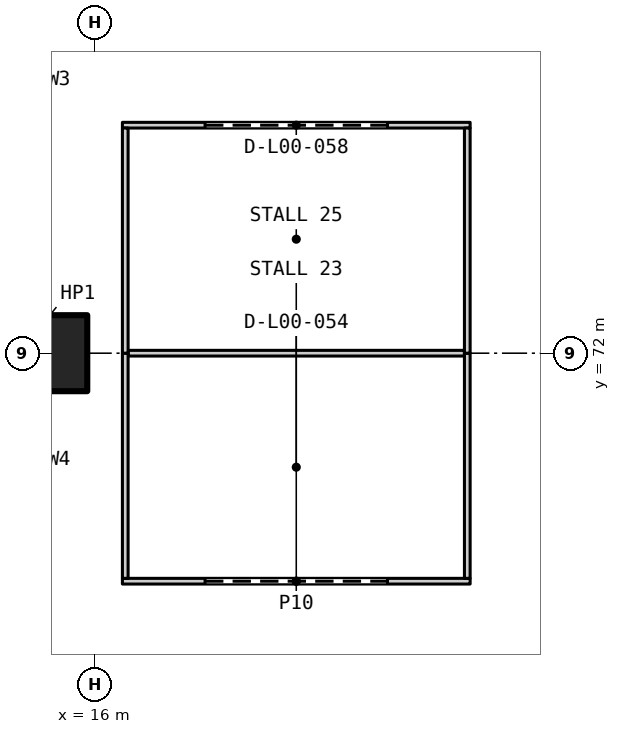
"""IFC4 building model, lengths in metres.
Left out: names, types, materials, properties, quantities, classifications, styles, units other than length and angle.
Written with IfcOpenShell. Run it as: python <this file> out.ifc"""

import sys

from ifc_helpers import new_model, si_unit, direction, frame, frame_2d, origin, origin_2d, place, context, subcontext, project, spatial, rectangle, extrude, element, fill, save


model = new_model("IFC4")
c1 = context("Model", 3, precision=1e-05, world=origin(), true_north=direction((0.0, 1.0)))
c2 = subcontext(c1, "Body", "Model", "MODEL_VIEW")
j1 = project(units=[si_unit("LENGTHUNIT", "METRE"), si_unit("PLANEANGLEUNIT", "RADIAN")], contexts=[c1])
p1 = place(None, origin())
s1 = spatial("IfcSite", under=j1, at=p1, CompositionType="ELEMENT")
p2 = place(p1, origin())
s2 = spatial("IfcBuilding", under=s1, at=p2, CompositionType="ELEMENT")
p3 = place(p2, origin())
s3 = spatial("IfcBuildingStorey", under=s2, at=p3, CompositionType="ELEMENT", Elevation=0.0)
p4 = place(p3, frame((15.0, 72.0, 0.0), z_axis=(0.0, 0.0, 1.0), x_axis=(1.0, 0.0, 0.0)))
e1 = element("IfcColumn", 1, at=p4, inside=s3, PredefinedType="COLUMN", context=c2, shape_type="SweptSolid", body=[
    extrude(rectangle(XDim=1.8, YDim=1.0, at=origin_2d()), origin(), (0.0, 0.0, 1.0), 6.0),
])
p5 = place(p3, frame((16.363, 69.0, 0.0), z_axis=(0.0, 0.0, 1.0), x_axis=(1.0, 0.0, 0.0)))
e2 = element("IfcWall", 2, at=p5, inside=s3, PredefinedType="PARTITIONING", context=c2, shape_type="SweptSolid", body=[
    extrude(rectangle(XDim=4.575, YDim=0.075, at=frame_2d((2.288, 0.0))), origin(), (0.0, 0.0, 1.0), 3.0),
])
p6 = place(p5, frame((1.087, 0.0, 0.0)))
e3 = element("IfcOpeningElement", 3, at=p6, cuts=e2, PredefinedType="OPENING", context=c2, shape_type="SweptSolid", body=[
    extrude(rectangle(XDim=2.4, YDim=2.4, at=frame_2d((1.2, 1.2))), frame((0.0, 0.047, 0.0), z_axis=(0.0, -1.0, 0.0), x_axis=(1.0, 0.0, 0.0)), (0.0, 0.0, 1.0), 0.095),
])
p7 = place(p3, frame((16.438, 72.0, 0.0), z_axis=(0.0, 0.0, 1.0), x_axis=(1.0, 0.0, 0.0)))
e4 = element("IfcWall", 4, at=p7, inside=s3, PredefinedType="PARTITIONING", context=c2, shape_type="SweptSolid", body=[
    extrude(rectangle(XDim=4.425, YDim=0.075, at=frame_2d((2.212, 0.0))), origin(), (0.0, 0.0, 1.0), 3.0),
])
p8 = place(p3, frame((16.363, 75.0, 0.0), z_axis=(0.0, 0.0, 1.0), x_axis=(1.0, 0.0, 0.0)))
e5 = element("IfcWall", 5, at=p8, inside=s3, PredefinedType="PARTITIONING", context=c2, shape_type="SweptSolid", body=[
    extrude(rectangle(XDim=4.575, YDim=0.075, at=frame_2d((2.288, 0.0))), origin(), (0.0, 0.0, 1.0), 3.0),
])
p9 = place(p8, frame((1.087, 0.0, 0.0)))
e6 = element("IfcOpeningElement", 6, at=p9, cuts=e5, PredefinedType="OPENING", context=c2, shape_type="SweptSolid", body=[
    extrude(rectangle(XDim=2.4, YDim=2.4, at=frame_2d((1.2, 1.2))), frame((0.0, 0.047, 0.0), z_axis=(0.0, -1.0, 0.0), x_axis=(1.0, 0.0, 0.0)), (0.0, 0.0, 1.0), 0.095),
])
for number, where, z_axis, x_axis in (
    (7, (16.4, 69.038, 0.0), (0.0, 0.0, 1.0), (0.0, 1.0, 0.0)),
    (8, (16.4, 72.0, 0.0), (0.0, 0.0, 1.0), (0.0, 1.0, 0.0)),
    (9, (20.9, 69.038, 0.0), (0.0, 0.0, 1.0), (0.0, 1.0, 0.0)),
    (10, (20.9, 72.0, 0.0), (0.0, 0.0, 1.0), (0.0, 1.0, 0.0)),
):
    element("IfcWall", number, at=place(p3, frame(where, z_axis=z_axis, x_axis=x_axis)), inside=s3, PredefinedType="PARTITIONING", context=c2, shape_type="SweptSolid", body=[
        extrude(rectangle(XDim=2.962, YDim=0.075, at=frame_2d((1.481, 0.0))), origin(), (0.0, 0.0, 1.0), 3.0),
    ])
p10 = place(p6, origin())
e11 = element("IfcDoor", 11, at=p10, inside=s3, OperationType="ROLLINGUP", PredefinedType="DOOR", context=c2, shape_type="SweptSolid", body=[
    extrude(rectangle(XDim=2.4, YDim=2.4, at=frame_2d((1.2, 1.2))), frame((0.0, 0.025, 0.0), z_axis=(0.0, -1.0, 0.0), x_axis=(1.0, 0.0, 0.0)), (0.0, 0.0, 1.0), 0.05),
])
fill(e3, e11)
p11 = place(p9, origin())
e12 = element("IfcDoor", 12, at=p11, inside=s3, OperationType="ROLLINGUP", PredefinedType="DOOR", context=c2, shape_type="SweptSolid", body=[
    extrude(rectangle(XDim=2.4, YDim=2.4, at=frame_2d((1.2, 1.2))), frame((0.0, 0.025, 0.0), z_axis=(0.0, -1.0, 0.0), x_axis=(1.0, 0.0, 0.0)), (0.0, 0.0, 1.0), 0.05),
])
fill(e6, e12)
save(model, sys.argv[1])
